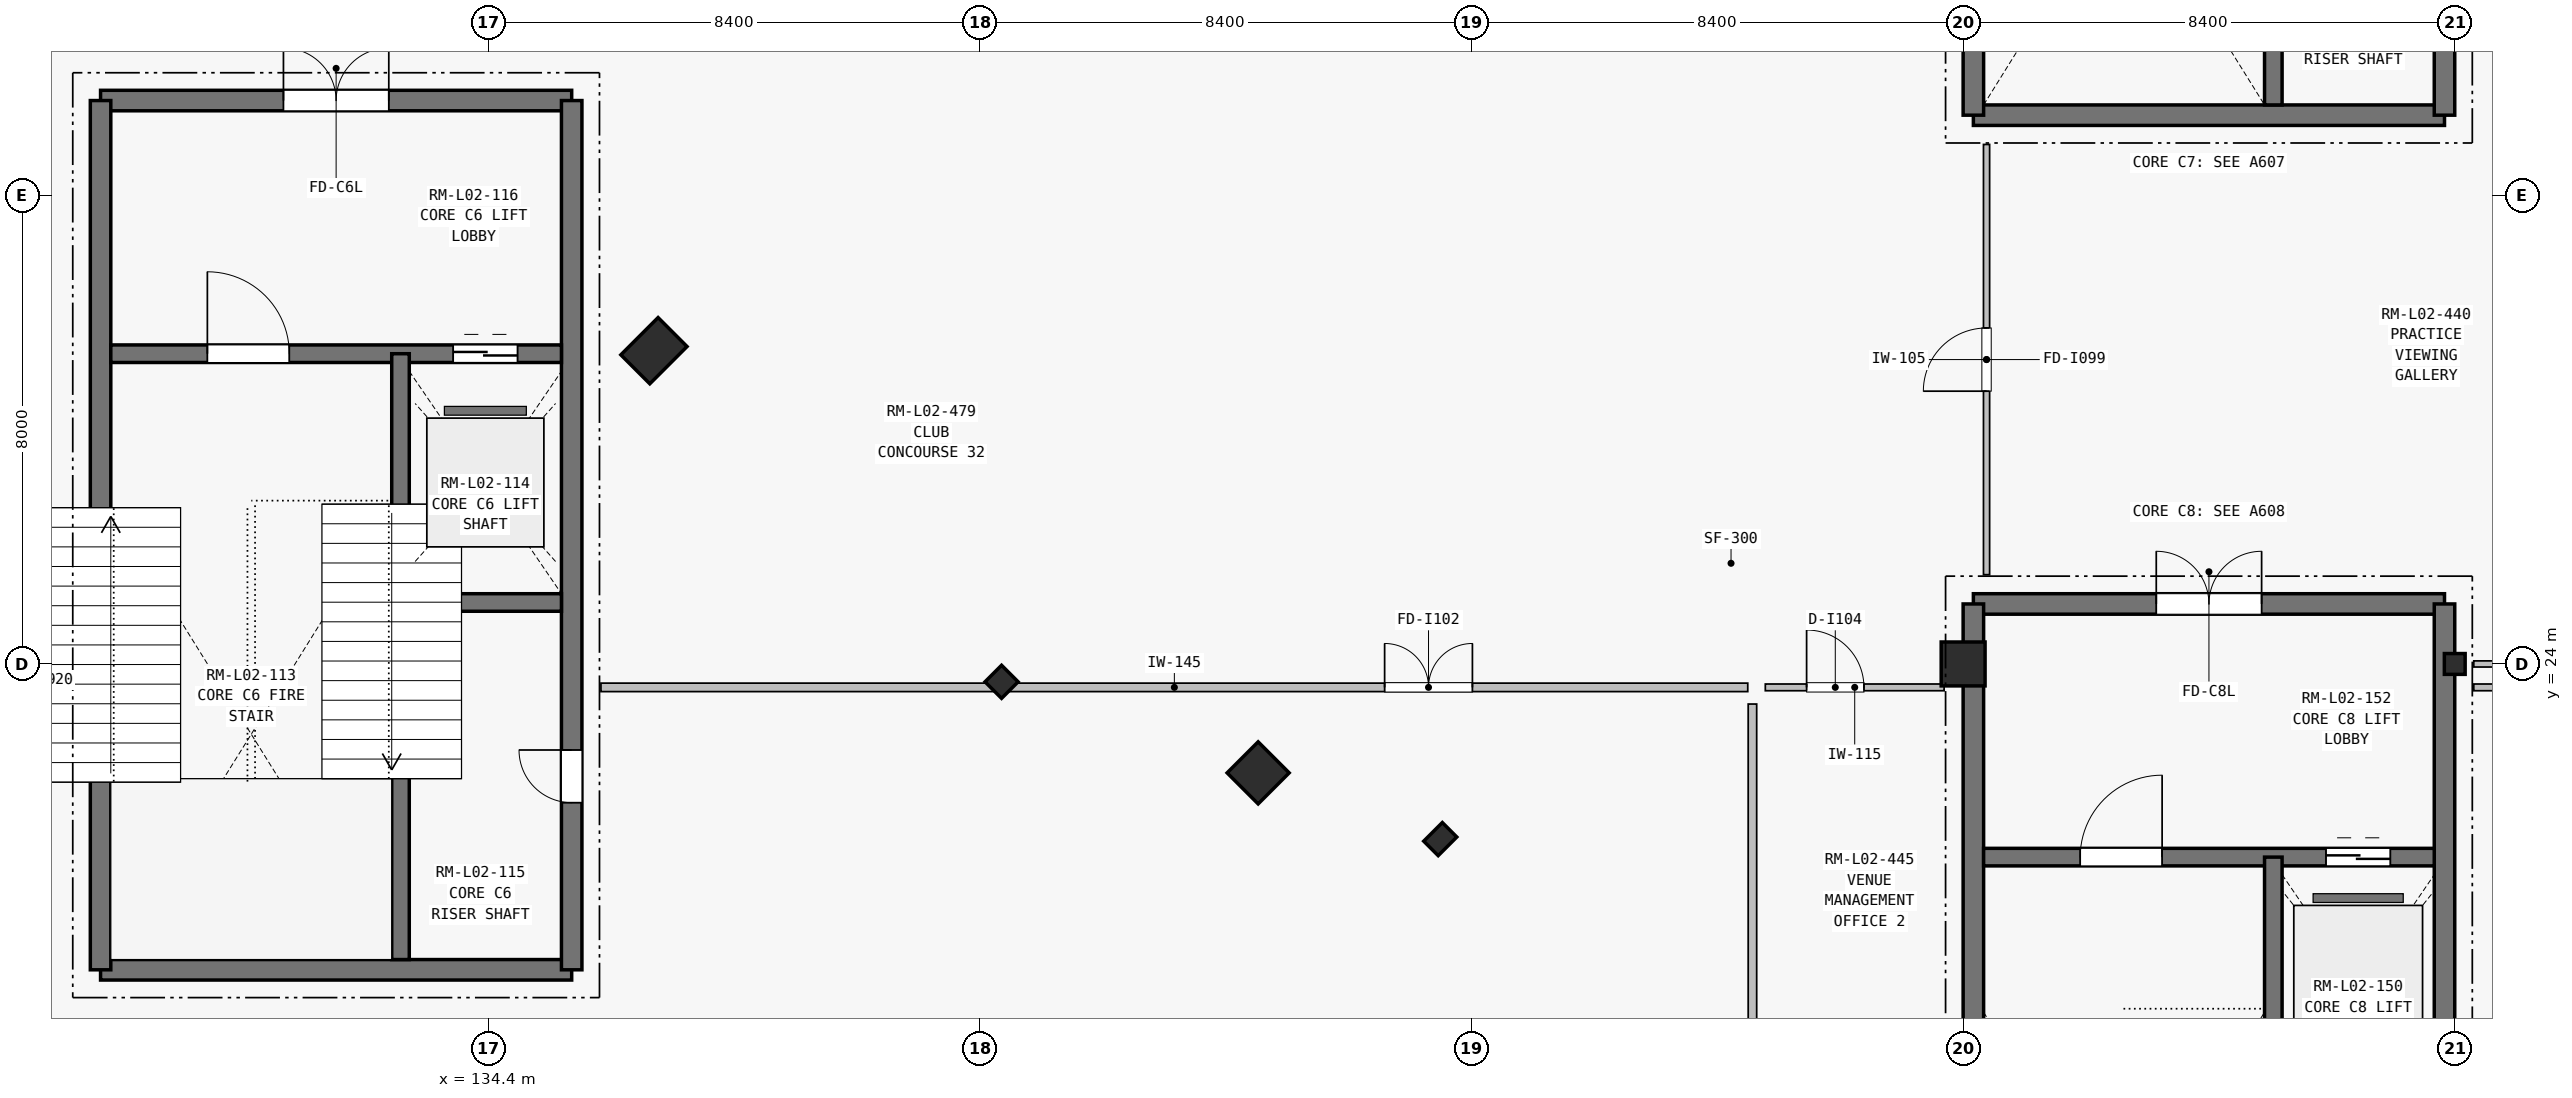
"""IFC4 building model, lengths in metres.
Left out: names, types, materials, properties, quantities, classifications, styles, units other than length and angle.
Written with IfcOpenShell. Run it as: python <this file> out.ifc"""

import sys

from ifc_helpers import new_model, si_unit, direction, frame, frame_2d, origin, origin_2d, place, context, subcontext, project, spatial, rectangle, hollow_circle, i_section, extrude, element, fill, save


model = new_model("IFC4")
c1 = context("Model", 3, precision=1e-05, world=origin(), true_north=direction((0.0, 1.0)))
c2 = subcontext(c1, "Body", "Model", "MODEL_VIEW")
j1 = project(units=[si_unit("LENGTHUNIT", "METRE"), si_unit("PLANEANGLEUNIT", "RADIAN")], contexts=[c1])
p1 = place(None, origin())
s1 = spatial("IfcSite", under=j1, at=p1, CompositionType="ELEMENT")
p2 = place(p1, origin())
s2 = spatial("IfcBuilding", under=s1, at=p2, CompositionType="ELEMENT")
p3 = place(p2, frame((0.0, 0.0, 9.9)))
s3 = spatial("IfcBuildingStorey", under=s2, at=p3, CompositionType="ELEMENT", Elevation=9.9)
p4 = place(p3, frame((137.231, 29.352, 0.0), z_axis=(0.0, 0.0, 1.0), x_axis=(0.707106781187, -0.707106781187, 0.0)))
e1 = element("IfcColumn", 1, at=p4, inside=s3, PredefinedType="COLUMN", context=c2, shape_type="SweptSolid", body=[
    extrude(rectangle(XDim=0.7, YDim=0.9, at=origin_2d()), origin(), (0.0, 0.0, 1.0), 4.5),
])
p5 = place(p3, frame((143.17, 23.695, 0.0), z_axis=(0.0, 0.0, 1.0), x_axis=(0.707106781187, -0.707106781187, 0.0)))
e2 = element("IfcColumn", 2, at=p5, inside=s3, PredefinedType="COLUMN", context=c2, shape_type="SweptSolid", body=[
    extrude(i_section(OverallWidth=0.4, OverallDepth=0.4, WebThickness=0.016, FlangeThickness=0.028, at=origin_2d()), origin(), (0.0, 0.0, 1.0), 4.5),
])
p6 = place(p3, frame((147.554, 22.139, 0.0), z_axis=(0.0, 0.0, 1.0), x_axis=(0.707106781187, -0.707106781187, 0.0)))
e3 = element("IfcColumn", 3, at=p6, inside=s3, PredefinedType="COLUMN", context=c2, shape_type="SweptSolid", body=[
    extrude(rectangle(XDim=0.75, YDim=0.75, at=origin_2d()), origin(), (0.0, 0.0, 1.0), 4.5),
])
p7 = place(p3, frame((159.6, 24.0, 0.0), z_axis=(0.0, 0.0, 1.0), x_axis=(1.0, 0.0, 0.0)))
e4 = element("IfcColumn", 4, at=p7, inside=s3, PredefinedType="COLUMN", context=c2, shape_type="SweptSolid", body=[
    extrude(rectangle(XDim=0.75, YDim=0.75, at=origin_2d()), origin(), (0.0, 0.0, 1.0), 4.26),
])
p8 = place(p3, frame((168.0, 24.0, 0.0), z_axis=(0.0, 0.0, 1.0), x_axis=(1.0, 0.0, 0.0)))
e5 = element("IfcColumn", 5, at=p8, inside=s3, PredefinedType="COLUMN", context=c2, shape_type="SweptSolid", body=[
    extrude(hollow_circle(Radius=0.178, WallThickness=0.013, at=origin_2d()), origin(), (0.0, 0.0, 1.0), 4.26),
])
p9 = place(p3, frame((150.666, 21.008, 0.0), z_axis=(0.0, 0.0, 1.0), x_axis=(0.707106781187, -0.707106781187, 0.0)))
e6 = element("IfcColumn", 6, at=p9, inside=s3, PredefinedType="PILASTER", context=c2, shape_type="SweptSolid", body=[
    extrude(rectangle(XDim=0.35, YDim=0.45, at=origin_2d()), origin(), (0.0, 0.0, 1.0), 5.45),
])
p10 = place(p3, frame((127.775, 18.775, 0.0), z_axis=(0.0, 0.0, 1.0), x_axis=(1.0, 0.0, 0.0)))
e7 = element("IfcWall", 7, at=p10, inside=s3, PredefinedType="SHEAR", context=c2, shape_type="SweptSolid", body=[
    extrude(rectangle(XDim=8.05, YDim=0.35, at=frame_2d((4.025, 0.0))), origin(), (0.0, 0.0, 1.0), 4.5),
])
p11 = place(p3, frame((127.775, 33.625, 0.0), z_axis=(0.0, 0.0, 1.0), x_axis=(1.0, 0.0, 0.0)))
e8 = element("IfcWall", 8, at=p11, inside=s3, PredefinedType="SHEAR", context=c2, shape_type="SweptSolid", body=[
    extrude(rectangle(XDim=8.05, YDim=0.35, at=frame_2d((4.025, 0.0))), origin(), (0.0, 0.0, 1.0), 4.5),
])
p12 = place(p11, frame((3.125, 0.0, 0.0)))
e9 = element("IfcOpeningElement", 9, at=p12, cuts=e8, PredefinedType="OPENING", context=c2, shape_type="SweptSolid", body=[
    extrude(rectangle(XDim=1.8, YDim=2.25, at=frame_2d((0.9, 1.125))), frame((0.0, 0.185, 0.0), z_axis=(0.0, -1.0, 0.0), x_axis=(1.0, 0.0, 0.0)), (0.0, 0.0, 1.0), 0.37),
])
p13 = place(p3, frame((127.775, 18.775, 0.0), z_axis=(0.0, 0.0, 1.0), x_axis=(0.0, 1.0, 0.0)))
e10 = element("IfcWall", 10, at=p13, inside=s3, PredefinedType="SHEAR", context=c2, shape_type="SweptSolid", body=[
    extrude(rectangle(XDim=14.85, YDim=0.35, at=frame_2d((7.425, 0.0))), origin(), (0.0, 0.0, 1.0), 4.5),
])
p14 = place(p3, frame((135.825, 18.775, 0.0), z_axis=(0.0, 0.0, 1.0), x_axis=(0.0, 1.0, 0.0)))
e11 = element("IfcWall", 11, at=p14, inside=s3, PredefinedType="SHEAR", context=c2, shape_type="SweptSolid", body=[
    extrude(rectangle(XDim=14.85, YDim=0.35, at=frame_2d((7.425, 0.0))), origin(), (0.0, 0.0, 1.0), 4.5),
])
p15 = place(p14, frame((2.855, 0.0, 0.0)))
e12 = element("IfcOpeningElement", 12, at=p15, cuts=e11, PredefinedType="OPENING", context=c2, shape_type="SweptSolid", body=[
    extrude(rectangle(XDim=0.9, YDim=2.1, at=frame_2d((0.45, 1.05))), frame((0.0, 0.185, 0.0), z_axis=(0.0, -1.0, 0.0), x_axis=(1.0, 0.0, 0.0)), (0.0, 0.0, 1.0), 0.37),
])
p16 = place(p3, frame((127.95, 29.3, 0.0), z_axis=(0.0, 0.0, 1.0), x_axis=(1.0, 0.0, 0.0)))
e13 = element("IfcWall", 13, at=p16, inside=s3, PredefinedType="SHEAR", context=c2, shape_type="SweptSolid", body=[
    extrude(rectangle(XDim=7.7, YDim=0.3, at=frame_2d((3.85, 0.0))), origin(), (0.0, 0.0, 1.0), 4.5),
])
p17 = place(p16, frame((1.65, 0.0, 0.0)))
e14 = element("IfcOpeningElement", 14, at=p17, cuts=e13, PredefinedType="OPENING", context=c2, shape_type="SweptSolid", body=[
    extrude(rectangle(XDim=1.4, YDim=2.2, at=frame_2d((0.7, 1.1))), frame((0.0, 0.16, 0.0), z_axis=(0.0, -1.0, 0.0), x_axis=(1.0, 0.0, 0.0)), (0.0, 0.0, 1.0), 0.32),
])
p18 = place(p16, frame((5.85, 0.0, 0.0)))
e15 = element("IfcOpeningElement", 15, at=p18, cuts=e13, PredefinedType="OPENING", context=c2, shape_type="SweptSolid", body=[
    extrude(rectangle(XDim=1.1, YDim=2.2, at=frame_2d((0.55, 1.1))), frame((0.0, 0.16, 0.0), z_axis=(0.0, -1.0, 0.0), x_axis=(1.0, 0.0, 0.0)), (0.0, 0.0, 1.0), 0.32),
])
p19 = place(p3, frame((132.9, 18.95, 0.0), z_axis=(0.0, 0.0, 1.0), x_axis=(0.0, 1.0, 0.0)))
e16 = element("IfcWall", 16, at=p19, inside=s3, PredefinedType="SHEAR", context=c2, shape_type="SweptSolid", body=[
    extrude(rectangle(XDim=10.35, YDim=0.3, at=frame_2d((5.175, 0.0))), origin(), (0.0, 0.0, 1.0), 4.5),
])
p20 = place(p3, frame((133.05, 25.05, 0.0), z_axis=(0.0, 0.0, 1.0), x_axis=(1.0, 0.0, 0.0)))
e17 = element("IfcWall", 17, at=p20, inside=s3, PredefinedType="SHEAR", context=c2, shape_type="SweptSolid", body=[
    extrude(rectangle(XDim=2.6, YDim=0.3, at=frame_2d((1.3, 0.0))), origin(), (0.0, 0.0, 1.0), 4.5),
])
p21 = place(p3, frame((159.775, 33.375, 0.0), z_axis=(0.0, 0.0, 1.0), x_axis=(1.0, 0.0, 0.0)))
e18 = element("IfcWall", 18, at=p21, inside=s3, PredefinedType="SHEAR", context=c2, shape_type="SweptSolid", body=[
    extrude(rectangle(XDim=8.05, YDim=0.35, at=frame_2d((4.025, 0.0))), origin(), (0.0, 0.0, 1.0), 4.5),
])
p22 = place(p3, frame((159.775, 33.375, 0.0), z_axis=(0.0, 0.0, 1.0), x_axis=(0.0, 1.0, 0.0)))
e19 = element("IfcWall", 19, at=p22, inside=s3, PredefinedType="SHEAR", context=c2, shape_type="SweptSolid", body=[
    extrude(rectangle(XDim=14.85, YDim=0.35, at=frame_2d((7.425, 0.0))), origin(), (0.0, 0.0, 1.0), 4.5),
])
p23 = place(p3, frame((167.825, 33.375, 0.0), z_axis=(0.0, 0.0, 1.0), x_axis=(0.0, 1.0, 0.0)))
e20 = element("IfcWall", 20, at=p23, inside=s3, PredefinedType="SHEAR", context=c2, shape_type="SweptSolid", body=[
    extrude(rectangle(XDim=14.85, YDim=0.35, at=frame_2d((7.425, 0.0))), origin(), (0.0, 0.0, 1.0), 4.5),
])
p24 = place(p23, frame((2.855, 0.0, 0.0)))
e21 = element("IfcOpeningElement", 21, at=p24, cuts=e20, PredefinedType="OPENING", context=c2, shape_type="SweptSolid", body=[
    extrude(rectangle(XDim=0.9, YDim=2.1, at=frame_2d((0.45, 1.05))), frame((0.0, 0.185, 0.0), z_axis=(0.0, -1.0, 0.0), x_axis=(1.0, 0.0, 0.0)), (0.0, 0.0, 1.0), 0.37),
])
p25 = place(p3, frame((164.9, 33.55, 0.0), z_axis=(0.0, 0.0, 1.0), x_axis=(0.0, 1.0, 0.0)))
e22 = element("IfcWall", 22, at=p25, inside=s3, PredefinedType="SHEAR", context=c2, shape_type="SweptSolid", body=[
    extrude(rectangle(XDim=10.35, YDim=0.3, at=frame_2d((5.175, 0.0))), origin(), (0.0, 0.0, 1.0), 4.5),
])
p26 = place(p3, frame((159.775, 25.025, 0.0), z_axis=(0.0, 0.0, 1.0), x_axis=(1.0, 0.0, 0.0)))
e23 = element("IfcWall", 23, at=p26, inside=s3, PredefinedType="SHEAR", context=c2, shape_type="SweptSolid", body=[
    extrude(rectangle(XDim=8.05, YDim=0.35, at=frame_2d((4.025, 0.0))), origin(), (0.0, 0.0, 1.0), 4.5),
])
p27 = place(p26, frame((3.125, 0.0, 0.0)))
e24 = element("IfcOpeningElement", 24, at=p27, cuts=e23, PredefinedType="OPENING", context=c2, shape_type="SweptSolid", body=[
    extrude(rectangle(XDim=1.8, YDim=2.25, at=frame_2d((0.9, 1.125))), frame((0.0, 0.185, 0.0), z_axis=(0.0, -1.0, 0.0), x_axis=(1.0, 0.0, 0.0)), (0.0, 0.0, 1.0), 0.37),
])
p28 = place(p3, frame((159.775, 10.175, 0.0), z_axis=(0.0, 0.0, 1.0), x_axis=(0.0, 1.0, 0.0)))
e25 = element("IfcWall", 25, at=p28, inside=s3, PredefinedType="SHEAR", context=c2, shape_type="SweptSolid", body=[
    extrude(rectangle(XDim=14.85, YDim=0.35, at=frame_2d((7.425, 0.0))), origin(), (0.0, 0.0, 1.0), 4.5),
])
p29 = place(p3, frame((167.825, 10.175, 0.0), z_axis=(0.0, 0.0, 1.0), x_axis=(0.0, 1.0, 0.0)))
e26 = element("IfcWall", 26, at=p29, inside=s3, PredefinedType="SHEAR", context=c2, shape_type="SweptSolid", body=[
    extrude(rectangle(XDim=14.85, YDim=0.35, at=frame_2d((7.425, 0.0))), origin(), (0.0, 0.0, 1.0), 4.5),
])
p30 = place(p29, frame((2.855, 0.0, 0.0)))
e27 = element("IfcOpeningElement", 27, at=p30, cuts=e26, PredefinedType="OPENING", context=c2, shape_type="SweptSolid", body=[
    extrude(rectangle(XDim=0.9, YDim=2.1, at=frame_2d((0.45, 1.05))), frame((0.0, 0.185, 0.0), z_axis=(0.0, -1.0, 0.0), x_axis=(1.0, 0.0, 0.0)), (0.0, 0.0, 1.0), 0.37),
])
p31 = place(p3, frame((159.95, 20.7, 0.0), z_axis=(0.0, 0.0, 1.0), x_axis=(1.0, 0.0, 0.0)))
e28 = element("IfcWall", 28, at=p31, inside=s3, PredefinedType="SHEAR", context=c2, shape_type="SweptSolid", body=[
    extrude(rectangle(XDim=7.7, YDim=0.3, at=frame_2d((3.85, 0.0))), origin(), (0.0, 0.0, 1.0), 4.5),
])
p32 = place(p31, frame((1.65, 0.0, 0.0)))
e29 = element("IfcOpeningElement", 29, at=p32, cuts=e28, PredefinedType="OPENING", context=c2, shape_type="SweptSolid", body=[
    extrude(rectangle(XDim=1.4, YDim=2.2, at=frame_2d((0.7, 1.1))), frame((0.0, 0.16, 0.0), z_axis=(0.0, -1.0, 0.0), x_axis=(1.0, 0.0, 0.0)), (0.0, 0.0, 1.0), 0.32),
])
p33 = place(p31, frame((5.85, 0.0, 0.0)))
e30 = element("IfcOpeningElement", 30, at=p33, cuts=e28, PredefinedType="OPENING", context=c2, shape_type="SweptSolid", body=[
    extrude(rectangle(XDim=1.1, YDim=2.2, at=frame_2d((0.55, 1.1))), frame((0.0, 0.16, 0.0), z_axis=(0.0, -1.0, 0.0), x_axis=(1.0, 0.0, 0.0)), (0.0, 0.0, 1.0), 0.32),
])
p34 = place(p3, frame((164.9, 10.35, 0.0), z_axis=(0.0, 0.0, 1.0), x_axis=(0.0, 1.0, 0.0)))
e31 = element("IfcWall", 31, at=p34, inside=s3, PredefinedType="SHEAR", context=c2, shape_type="SweptSolid", body=[
    extrude(rectangle(XDim=10.35, YDim=0.3, at=frame_2d((5.175, 0.0))), origin(), (0.0, 0.0, 1.0), 4.5),
])
p35 = place(p3, frame((170.913, 24.0, 0.0), z_axis=(0.0, 0.0, 1.0), x_axis=(-1.0, 0.0, 0.0)))
e32 = element("IfcWall", 32, at=p35, inside=s3, PredefinedType="PARTITIONING", context=c2, shape_type="SweptSolid", body=[
    extrude(rectangle(XDim=2.588, YDim=0.105, at=frame_2d((1.294, 0.0))), origin(), (0.0, 0.0, 1.0), 4.26),
])
p36 = place(p3, frame((160.0, 25.525, 0.0), z_axis=(0.0, 0.0, 1.0), x_axis=(0.0, 1.0, 0.0)))
e33 = element("IfcWall", 33, at=p36, inside=s3, PredefinedType="PARTITIONING", context=c2, shape_type="SweptSolid", body=[
    extrude(rectangle(XDim=7.35, YDim=0.105, at=frame_2d((3.675, 0.0))), origin(), (0.0, 0.0, 1.0), 4.26),
])
p37 = place(p36, frame((3.135, 0.0, 0.0)))
e34 = element("IfcOpeningElement", 34, at=p37, cuts=e33, PredefinedType="OPENING", context=c2, shape_type="SweptSolid", body=[
    extrude(rectangle(XDim=1.08, YDim=2.15, at=frame_2d((0.54, 1.075))), frame((0.0, 0.062, 0.0), z_axis=(0.0, -1.0, 0.0), x_axis=(1.0, 0.0, 0.0)), (0.0, 0.0, 1.0), 0.125),
])
p38 = place(p3, frame((136.325, 23.6, 0.0), z_axis=(0.0, 0.0, 1.0), x_axis=(1.0, 0.0, 0.0)))
e35 = element("IfcWall", 35, at=p38, inside=s3, PredefinedType="PARTITIONING", context=c2, shape_type="SweptSolid", body=[
    extrude(rectangle(XDim=19.595, YDim=0.145, at=frame_2d((9.797, 0.0))), origin(), (0.0, 0.0, 1.0), 3.245),
])
p39 = place(p38, frame((13.39, 0.0, 0.0)))
e36 = element("IfcOpeningElement", 36, at=p39, cuts=e35, PredefinedType="OPENING", context=c2, shape_type="SweptSolid", body=[
    extrude(rectangle(XDim=1.5, YDim=2.2, at=frame_2d((0.75, 1.1))), frame((0.0, 0.083, 0.0), z_axis=(0.0, -1.0, 0.0), x_axis=(1.0, 0.0, 0.0)), (0.0, 0.0, 1.0), 0.165),
])
p40 = place(p3, frame((156.0, 23.315, 0.0), z_axis=(0.0, 0.0, 1.0), x_axis=(0.0, -1.0, 0.0)))
e37 = element("IfcWall", 37, at=p40, inside=s3, PredefinedType="PARTITIONING", context=c2, shape_type="SweptSolid", body=[
    extrude(rectangle(XDim=14.665, YDim=0.145, at=frame_2d((7.333, 0.0))), origin(), (0.0, 0.0, 1.0), 3.325),
])
p41 = place(p40, frame((7.879, 0.0, 0.0)))
e38 = element("IfcOpeningElement", 38, at=p41, cuts=e37, PredefinedType="OPENING", context=c2, shape_type="SweptSolid", body=[
    extrude(rectangle(XDim=1.08, YDim=2.15, at=frame_2d((0.54, 1.075))), frame((0.0, 0.083, 0.0), z_axis=(0.0, -1.0, 0.0), x_axis=(1.0, 0.0, 0.0)), (0.0, 0.0, 1.0), 0.165),
])
p42 = place(p3, frame((156.22, 23.6, 0.0), z_axis=(0.0, 0.0, 1.0), x_axis=(1.0, 0.0, 0.0)))
e39 = element("IfcWall", 39, at=p42, inside=s3, PredefinedType="PARTITIONING", context=c2, shape_type="SweptSolid", body=[
    extrude(rectangle(XDim=3.055, YDim=0.115, at=frame_2d((1.527, 0.0))), origin(), (0.0, 0.0, 1.0), 4.26),
])
p43 = place(p42, frame((0.706, 0.0, 0.0)))
e40 = element("IfcOpeningElement", 40, at=p43, cuts=e39, PredefinedType="OPENING", context=c2, shape_type="SweptSolid", body=[
    extrude(rectangle(XDim=0.98, YDim=2.15, at=frame_2d((0.49, 1.075))), frame((0.0, 0.067, 0.0), z_axis=(0.0, -1.0, 0.0), x_axis=(1.0, 0.0, 0.0)), (0.0, 0.0, 1.0), 0.135),
])
p44 = place(p3, frame((168.325, 23.6, 0.0), z_axis=(0.0, 0.0, 1.0), x_axis=(1.0, 0.0, 0.0)))
e41 = element("IfcWall", 41, at=p44, inside=s3, PredefinedType="PARTITIONING", context=c2, shape_type="SweptSolid", body=[
    extrude(rectangle(XDim=2.588, YDim=0.115, at=frame_2d((1.294, 0.0))), origin(), (0.0, 0.0, 1.0), 4.26),
])
p45 = place(p12, origin())
e42 = element("IfcDoor", 42, at=p45, inside=s3, OperationType="DOUBLE_DOOR_SINGLE_SWING", PredefinedType="DOOR", context=c2, shape_type="SweptSolid", body=[
    extrude(rectangle(XDim=1.8, YDim=2.25, at=frame_2d((0.9, 1.125))), frame((0.0, 0.025, 0.0), z_axis=(0.0, -1.0, 0.0), x_axis=(1.0, 0.0, 0.0)), (0.0, 0.0, 1.0), 0.05),
])
fill(e9, e42)
p46 = place(p17, origin())
e43 = element("IfcDoor", 43, at=p46, inside=s3, OperationType="SINGLE_SWING_LEFT", PredefinedType="DOOR", context=c2, shape_type="SweptSolid", body=[
    extrude(rectangle(XDim=1.4, YDim=2.2, at=frame_2d((0.7, 1.1))), frame((0.0, 0.025, 0.0), z_axis=(0.0, -1.0, 0.0), x_axis=(1.0, 0.0, 0.0)), (0.0, 0.0, 1.0), 0.05),
])
fill(e14, e43)
p47 = place(p15, origin())
e44 = element("IfcDoor", 44, at=p47, inside=s3, OperationType="SINGLE_SWING_RIGHT", PredefinedType="DOOR", context=c2, shape_type="SweptSolid", body=[
    extrude(rectangle(XDim=0.9, YDim=2.1, at=frame_2d((0.45, 1.05))), frame((0.0, 0.025, 0.0), z_axis=(0.0, -1.0, 0.0), x_axis=(1.0, 0.0, 0.0)), (0.0, 0.0, 1.0), 0.05),
])
fill(e12, e44)
p48 = place(p18, origin())
e45 = element("IfcDoor", 45, at=p48, inside=s3, OperationType="SLIDING_TO_LEFT", PredefinedType="DOOR", context=c2, shape_type="SweptSolid", body=[
    extrude(rectangle(XDim=1.1, YDim=2.2, at=frame_2d((0.55, 1.1))), frame((0.0, 0.025, 0.0), z_axis=(0.0, -1.0, 0.0), x_axis=(1.0, 0.0, 0.0)), (0.0, 0.0, 1.0), 0.05),
])
fill(e15, e45)
p49 = place(p27, origin())
e46 = element("IfcDoor", 46, at=p49, inside=s3, OperationType="DOUBLE_DOOR_SINGLE_SWING", PredefinedType="DOOR", context=c2, shape_type="SweptSolid", body=[
    extrude(rectangle(XDim=1.8, YDim=2.25, at=frame_2d((0.9, 1.125))), frame((0.0, 0.025, 0.0), z_axis=(0.0, -1.0, 0.0), x_axis=(1.0, 0.0, 0.0)), (0.0, 0.0, 1.0), 0.05),
])
fill(e24, e46)
p50 = place(p32, origin())
e47 = element("IfcDoor", 47, at=p50, inside=s3, OperationType="SINGLE_SWING_RIGHT", PredefinedType="DOOR", context=c2, shape_type="SweptSolid", body=[
    extrude(rectangle(XDim=1.4, YDim=2.2, at=frame_2d((0.7, 1.1))), frame((0.0, 0.025, 0.0), z_axis=(0.0, -1.0, 0.0), x_axis=(1.0, 0.0, 0.0)), (0.0, 0.0, 1.0), 0.05),
])
fill(e29, e47)
p51 = place(p33, origin())
e48 = element("IfcDoor", 48, at=p51, inside=s3, OperationType="SLIDING_TO_LEFT", PredefinedType="DOOR", context=c2, shape_type="SweptSolid", body=[
    extrude(rectangle(XDim=1.1, YDim=2.2, at=frame_2d((0.55, 1.1))), frame((0.0, 0.025, 0.0), z_axis=(0.0, -1.0, 0.0), x_axis=(1.0, 0.0, 0.0)), (0.0, 0.0, 1.0), 0.05),
])
fill(e30, e48)
p52 = place(p37, origin())
e49 = element("IfcDoor", 49, at=p52, inside=s3, OperationType="SINGLE_SWING_LEFT", PredefinedType="DOOR", context=c2, shape_type="SweptSolid", body=[
    extrude(rectangle(XDim=1.08, YDim=2.15, at=frame_2d((0.54, 1.075))), frame((0.0, 0.025, 0.0), z_axis=(0.0, -1.0, 0.0), x_axis=(1.0, 0.0, 0.0)), (0.0, 0.0, 1.0), 0.05),
])
fill(e34, e49)
p53 = place(p39, origin())
e50 = element("IfcDoor", 50, at=p53, inside=s3, OperationType="DOUBLE_DOOR_SINGLE_SWING", PredefinedType="DOOR", context=c2, shape_type="SweptSolid", body=[
    extrude(rectangle(XDim=1.5, YDim=2.2, at=frame_2d((0.75, 1.1))), frame((0.0, 0.025, 0.0), z_axis=(0.0, -1.0, 0.0), x_axis=(1.0, 0.0, 0.0)), (0.0, 0.0, 1.0), 0.05),
])
fill(e36, e50)
p54 = place(p43, origin())
e51 = element("IfcDoor", 51, at=p54, inside=s3, OperationType="SINGLE_SWING_LEFT", PredefinedType="DOOR", context=c2, shape_type="SweptSolid", body=[
    extrude(rectangle(XDim=0.98, YDim=2.15, at=frame_2d((0.49, 1.075))), frame((0.0, 0.025, 0.0), z_axis=(0.0, -1.0, 0.0), x_axis=(1.0, 0.0, 0.0)), (0.0, 0.0, 1.0), 0.05),
])
fill(e40, e51)
save(model, sys.argv[1])
